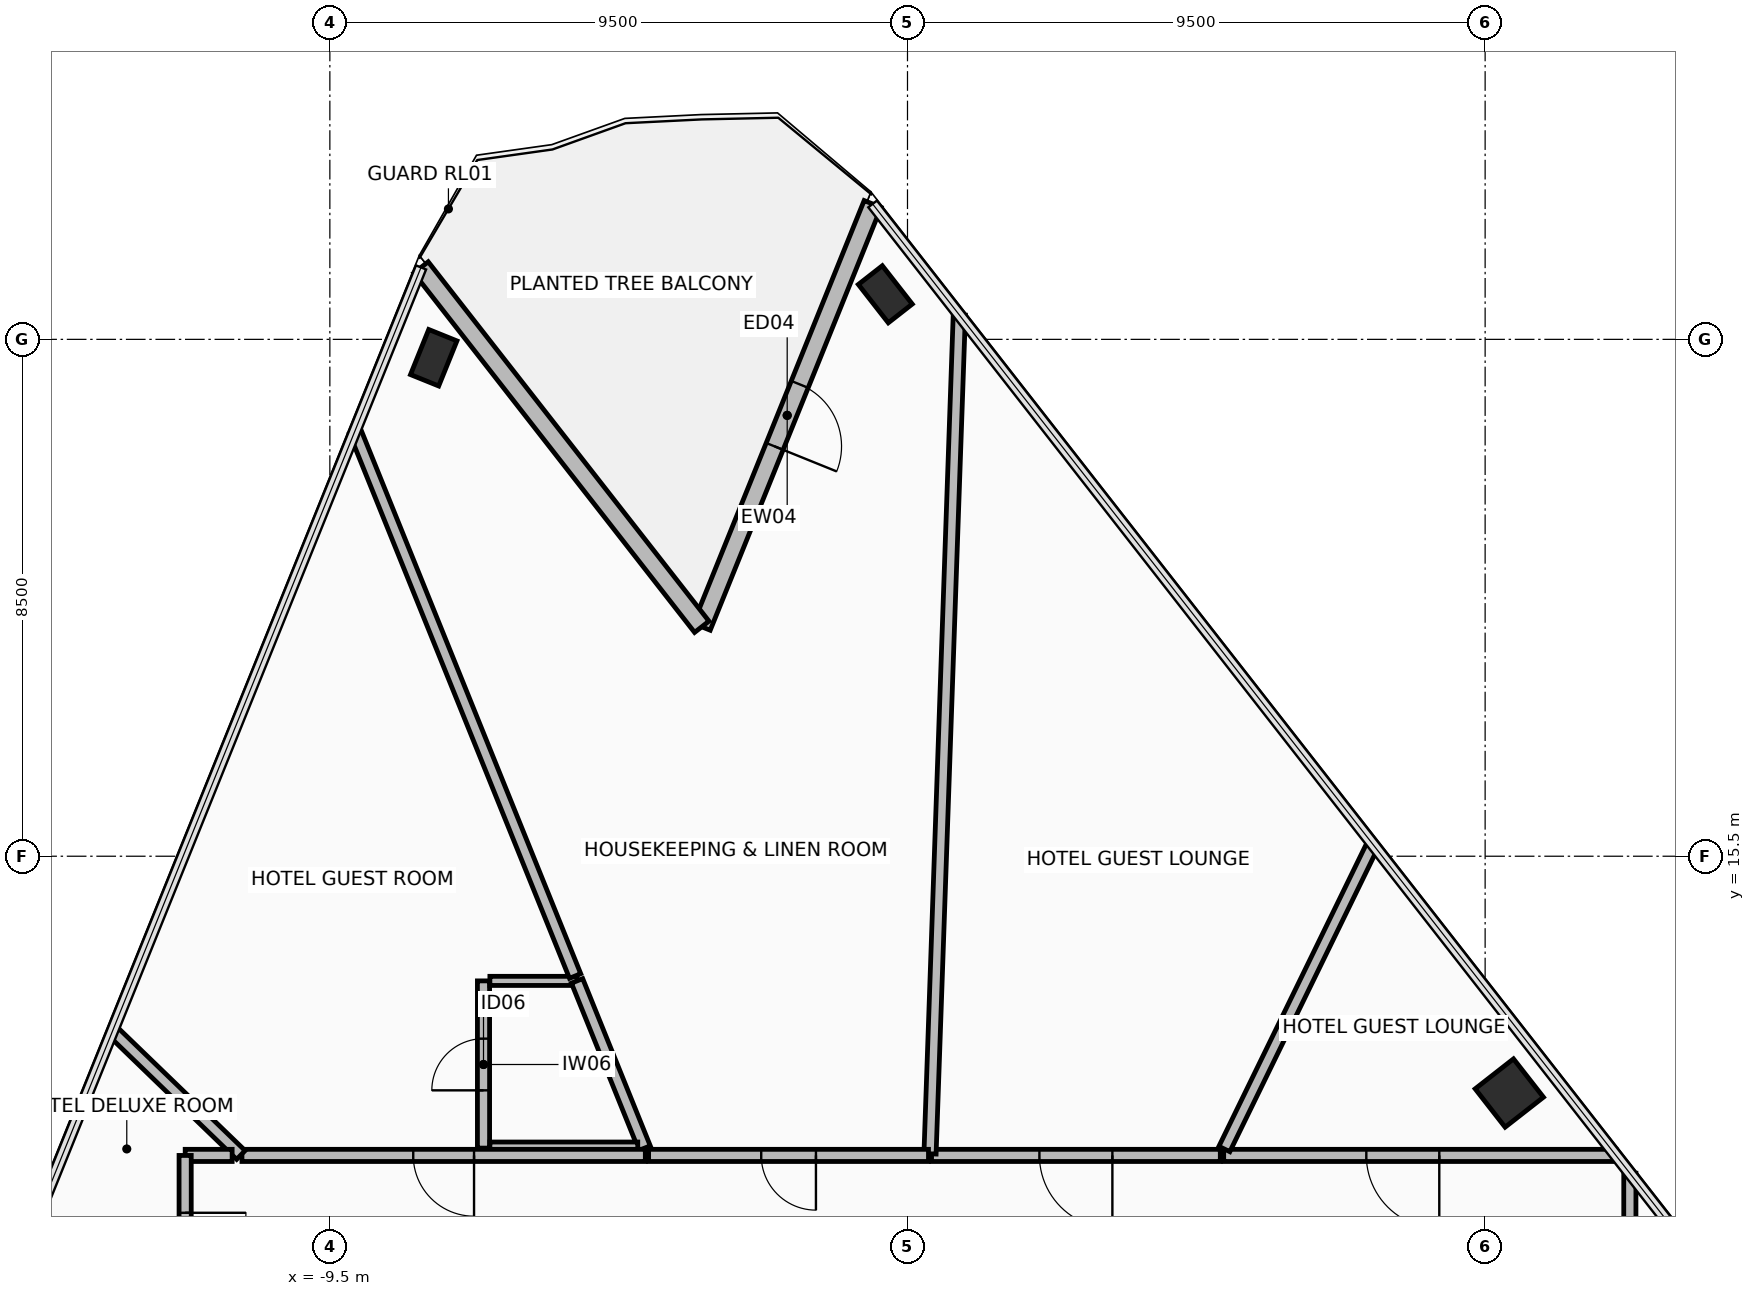
"""IFC4 building model, lengths in metres.
Left out: names, types, materials, properties, quantities, classifications, styles, units other than length and angle.
Written with IfcOpenShell. Run it as: python <this file> out.ifc"""

import sys

from ifc_helpers import new_model, si_unit, direction, frame, frame_2d, origin, origin_2d, place, context, subcontext, project, spatial, rectangle, hollow_rectangle, extrude, element, fill, save


model = new_model("IFC4")
c1 = context("Model", 3, precision=1e-05, world=origin(), true_north=direction((0.0, 1.0)))
c2 = subcontext(c1, "Body", "Model", "MODEL_VIEW")
j1 = project(units=[si_unit("LENGTHUNIT", "METRE"), si_unit("PLANEANGLEUNIT", "RADIAN")], contexts=[c1])
p1 = place(None, origin())
s1 = spatial("IfcSite", under=j1, at=p1, CompositionType="ELEMENT")
p2 = place(p1, origin())
s2 = spatial("IfcBuilding", under=s1, at=p2, CompositionType="ELEMENT")
p3 = place(p2, frame((0.0, 0.0, 77.65)))
s3 = spatial("IfcBuildingStorey", under=s2, at=p3, CompositionType="ELEMENT", Elevation=77.65)
p4 = place(p3, frame((-7.792, 23.698, 0.0), z_axis=(0.0, 0.0, 1.0), x_axis=(0.374608211656, 0.927183200754, 0.0)))
e1 = element("IfcColumn", 1, at=p4, inside=s3, PredefinedType="COLUMN", context=c2, shape_type="SweptSolid", body=[
    extrude(hollow_rectangle(XDim=0.5, YDim=0.8, WallThickness=0.04, at=origin_2d()), origin(), (0.0, 0.0, 1.0), 3.45),
])
p5 = place(p3, frame((9.898, 11.606, 0.0), z_axis=(0.0, 0.0, 1.0), x_axis=(-0.615661475326, 0.788010753607, 0.0)))
e2 = element("IfcColumn", 2, at=p5, inside=s3, PredefinedType="COLUMN", context=c2, shape_type="SweptSolid", body=[
    extrude(hollow_rectangle(XDim=0.8, YDim=0.8, WallThickness=0.045, at=origin_2d()), origin(), (0.0, 0.0, 1.0), 3.45),
])
p6 = place(p3, frame((-0.365, 24.741, 0.0), z_axis=(0.0, 0.0, 1.0), x_axis=(-0.615661475326, 0.788010753607, 0.0)))
e3 = element("IfcColumn", 3, at=p6, inside=s3, PredefinedType="COLUMN", context=c2, shape_type="SweptSolid", body=[
    extrude(hollow_rectangle(XDim=0.5, YDim=0.8, WallThickness=0.04, at=origin_2d()), origin(), (0.0, 0.0, 1.0), 3.45),
])
p7 = place(p3, frame((-0.574, 26.227, 0.0), z_axis=(0.0, 0.0, 1.0), x_axis=(-0.374609979755, -0.92718248639, 0.0)))
e4 = element("IfcWall", 4, at=p7, inside=s3, PredefinedType="STANDARD", context=c2, shape_type="SweptSolid", body=[
    extrude(rectangle(XDim=7.5, YDim=0.3, at=frame_2d((3.75, 0.0))), origin(), (0.0, 0.0, 1.0), 2.405),
])
p8 = place(p7, frame((3.2, 0.0, 0.0)))
e5 = element("IfcOpeningElement", 5, at=p8, cuts=e4, PredefinedType="OPENING", context=c2, shape_type="SweptSolid", body=[
    extrude(rectangle(XDim=1.1, YDim=2.2, at=frame_2d((0.55, 1.1))), frame((0.0, 0.16, 0.0), z_axis=(0.0, -1.0, 0.0), x_axis=(1.0, 0.0, 0.0)), (0.0, 0.0, 1.0), 0.32),
])
p9 = place(p3, frame((-3.383, 19.273, 0.0), z_axis=(0.0, 0.0, 1.0), x_axis=(-0.615654149001, 0.788016477504, 0.0)))
e6 = element("IfcWall", 6, at=p9, inside=s3, PredefinedType="STANDARD", context=c2, shape_type="SweptSolid", body=[
    extrude(rectangle(XDim=7.5, YDim=0.3, at=frame_2d((3.75, 0.0))), origin(), (0.0, 0.0, 1.0), 2.405),
])
p10 = place(p3, frame((-6.973, 10.7, 0.0), z_axis=(0.0, 0.0, 1.0), x_axis=(0.0, 1.0, 0.0)))
e7 = element("IfcWall", 7, at=p10, inside=s3, PredefinedType="PARTITIONING", context=c2, shape_type="SweptSolid", body=[
    extrude(rectangle(XDim=2.75, YDim=0.2, at=frame_2d((1.375, 0.0))), origin(), (0.0, 0.0, 1.0), 3.21),
])
p11 = place(p10, frame((0.95, 0.0, 0.0)))
e8 = element("IfcOpeningElement", 8, at=p11, cuts=e7, PredefinedType="OPENING", context=c2, shape_type="SweptSolid", body=[
    extrude(rectangle(XDim=0.85, YDim=2.1, at=frame_2d((0.425, 1.05))), frame((0.0, 0.11, 0.0), z_axis=(0.0, -1.0, 0.0), x_axis=(1.0, 0.0, 0.0)), (0.0, 0.0, 1.0), 0.22),
])
p12 = place(p3, frame((-6.868, 13.45, 0.0), z_axis=(0.0, 0.0, 1.0), x_axis=(1.0, 0.0, 0.0)))
e9 = element("IfcWall", 9, at=p12, inside=s3, PredefinedType="PARTITIONING", context=c2, shape_type="SweptSolid", body=[
    extrude(rectangle(XDim=1.434, YDim=0.15, at=frame_2d((0.717, 0.0))), origin(), (0.0, 0.0, 1.0), 3.21),
])
p13 = place(p3, frame((-5.434, 13.45, 0.0), z_axis=(0.0, 0.0, 1.0), x_axis=(0.374610031927, -0.927182465311, 0.0)))
e10 = element("IfcWall", 10, at=p13, inside=s3, PredefinedType="PARTITIONING", context=c2, shape_type="SweptSolid", body=[
    extrude(rectangle(XDim=2.966, YDim=0.2, at=frame_2d((1.483, 0.0))), origin(), (0.0, 0.0, 1.0), 3.21),
])
p14 = place(p3, frame((-4.436, 10.7, 0.0), z_axis=(0.0, 0.0, 1.0), x_axis=(-1.0, 0.0, 0.0)))
e11 = element("IfcWall", 11, at=p14, inside=s3, PredefinedType="PARTITIONING", context=c2, shape_type="SweptSolid", body=[
    extrude(rectangle(XDim=2.432, YDim=0.2, at=frame_2d((1.216, 0.0))), origin(), (0.0, 0.0, 1.0), 3.21),
])
p15 = place(p3, frame((11.88, 3.44, 0.0), z_axis=(0.0, 0.0, 1.0), x_axis=(0.0, 1.0, 0.0)))
e12 = element("IfcWall", 12, at=p15, inside=s3, PredefinedType="PARTITIONING", context=c2, shape_type="SweptSolid", body=[
    extrude(rectangle(XDim=6.847, YDim=0.2, at=frame_2d((3.424, 0.0))), origin(), (0.0, 0.0, 1.0), 2.405),
])
p16 = place(p15, frame((2.824, 0.0, 0.0)))
e13 = element("IfcOpeningElement", 13, at=p16, cuts=e12, PredefinedType="OPENING", context=c2, shape_type="SweptSolid", body=[
    extrude(rectangle(XDim=1.2, YDim=2.15, at=frame_2d((0.6, 1.075))), frame((0.0, 0.11, 0.0), z_axis=(0.0, -1.0, 0.0), x_axis=(1.0, 0.0, 0.0)), (0.0, 0.0, 1.0), 0.22),
])
p17 = place(p3, frame((11.651, 10.58, 0.0), z_axis=(0.0, 0.0, 1.0), x_axis=(-1.0, 0.0, 0.0)))
e14 = element("IfcWall", 14, at=p17, inside=s3, PredefinedType="PARTITIONING", context=c2, shape_type="SweptSolid", body=[
    extrude(rectangle(XDim=6.451, YDim=0.2, at=frame_2d((3.225, 0.0))), origin(), (0.0, 0.0, 1.0), 2.405),
])
p18 = place(p17, frame((2.905, 0.0, 0.0)))
e15 = element("IfcOpeningElement", 15, at=p18, cuts=e14, PredefinedType="OPENING", context=c2, shape_type="SweptSolid", body=[
    extrude(rectangle(XDim=1.2, YDim=2.15, at=frame_2d((0.6, 1.075))), frame((0.0, 0.11, 0.0), z_axis=(0.0, -1.0, 0.0), x_axis=(1.0, 0.0, 0.0)), (0.0, 0.0, 1.0), 0.22),
])
p19 = place(p3, frame((5.211, 10.685, 0.0), z_axis=(0.0, 0.0, 1.0), x_axis=(0.438361496965, 0.898798752769, 0.0)))
e16 = element("IfcWall", 16, at=p19, inside=s3, PredefinedType="PARTITIONING", context=c2, shape_type="SweptSolid", body=[
    extrude(rectangle(XDim=5.574, YDim=0.2, at=frame_2d((2.787, 0.0))), origin(), (0.0, 0.0, 1.0), 2.405),
])
p20 = place(p3, frame((5.145, 10.58, 0.0), z_axis=(0.0, 0.0, 1.0), x_axis=(-1.0, 0.0, 0.0)))
e17 = element("IfcWall", 17, at=p20, inside=s3, PredefinedType="PARTITIONING", context=c2, shape_type="SweptSolid", body=[
    extrude(rectangle(XDim=4.749, YDim=0.2, at=frame_2d((2.375, 0.0))), origin(), (0.0, 0.0, 1.0), 2.605),
])
p21 = place(p20, frame((1.775, 0.0, 0.0)))
e18 = element("IfcOpeningElement", 18, at=p21, cuts=e17, PredefinedType="OPENING", context=c2, shape_type="SweptSolid", body=[
    extrude(rectangle(XDim=1.2, YDim=2.15, at=frame_2d((0.6, 1.075))), frame((0.0, 0.11, 0.0), z_axis=(0.0, -1.0, 0.0), x_axis=(1.0, 0.0, 0.0)), (0.0, 0.0, 1.0), 0.22),
])
p22 = place(p3, frame((0.37, 10.606, 0.0), z_axis=(0.0, 0.0, 1.0), x_axis=(0.03489353046, 0.999391035347, 0.0)))
e19 = element("IfcWall", 19, at=p22, inside=s3, PredefinedType="PARTITIONING", context=c2, shape_type="SweptSolid", body=[
    extrude(rectangle(XDim=13.804, YDim=0.2, at=frame_2d((6.902, 0.0))), origin(), (0.0, 0.0, 1.0), 2.405),
])
p23 = place(p3, frame((0.345, 10.58, 0.0), z_axis=(0.0, 0.0, 1.0), x_axis=(-1.0, 0.0, 0.0)))
e20 = element("IfcWall", 20, at=p23, inside=s3, PredefinedType="PARTITIONING", context=c2, shape_type="SweptSolid", body=[
    extrude(rectangle(XDim=4.603, YDim=0.2, at=frame_2d((2.302, 0.0))), origin(), (0.0, 0.0, 1.0), 3.21),
])
p24 = place(p23, frame((1.851, 0.0, 0.0)))
e21 = element("IfcOpeningElement", 21, at=p24, cuts=e20, PredefinedType="OPENING", context=c2, shape_type="SweptSolid", body=[
    extrude(rectangle(XDim=0.9, YDim=2.1, at=frame_2d((0.45, 1.05))), frame((0.0, 0.11, 0.0), z_axis=(0.0, -1.0, 0.0), x_axis=(1.0, 0.0, 0.0)), (0.0, 0.0, 1.0), 0.22),
])
p25 = place(p3, frame((-5.467, 13.53, 0.0), z_axis=(0.0, 0.0, 1.0), x_axis=(-0.374609771438, 0.927182570556, 0.0)))
e22 = element("IfcWall", 22, at=p25, inside=s3, PredefinedType="PARTITIONING", context=c2, shape_type="SweptSolid", body=[
    extrude(rectangle(XDim=9.656, YDim=0.2, at=frame_2d((4.828, 0.0))), origin(), (0.0, 0.0, 1.0), 2.405),
])
p26 = place(p3, frame((-4.312, 10.58, 0.0), z_axis=(0.0, 0.0, 1.0), x_axis=(-1.0, 0.0, 0.0)))
e23 = element("IfcWall", 23, at=p26, inside=s3, PredefinedType="PARTITIONING", context=c2, shape_type="SweptSolid", body=[
    extrude(rectangle(XDim=6.634, YDim=0.2, at=frame_2d((3.317, 0.0))), origin(), (0.0, 0.0, 1.0), 2.605),
])
p27 = place(p26, frame((2.817, 0.0, 0.0)))
e24 = element("IfcOpeningElement", 24, at=p27, cuts=e23, PredefinedType="OPENING", context=c2, shape_type="SweptSolid", body=[
    extrude(rectangle(XDim=1.0, YDim=2.15, at=frame_2d((0.5, 1.075))), frame((0.0, 0.11, 0.0), z_axis=(0.0, -1.0, 0.0), x_axis=(1.0, 0.0, 0.0)), (0.0, 0.0, 1.0), 0.22),
])
p28 = place(p3, frame((-10.963, 10.587, 0.0), z_axis=(0.0, 0.0, 1.0), x_axis=(-0.719299093908, 0.69470052073, 0.0)))
e25 = element("IfcWall", 25, at=p28, inside=s3, PredefinedType="PARTITIONING", context=c2, shape_type="SweptSolid", body=[
    extrude(rectangle(XDim=2.918, YDim=0.2, at=frame_2d((1.459, 0.0))), origin(), (0.0, 0.0, 1.0), 2.405),
])
p29 = place(p3, frame((-11.107, 10.58, 0.0), z_axis=(0.0, 0.0, 1.0), x_axis=(-1.0, 0.0, 0.0)))
e26 = element("IfcWall", 26, at=p29, inside=s3, PredefinedType="PARTITIONING", context=c2, shape_type="SweptSolid", body=[
    extrude(rectangle(XDim=0.772, YDim=0.2, at=frame_2d((0.386, 0.0))), origin(), (0.0, 0.0, 1.0), 3.21),
])
p30 = place(p3, frame((-11.88, 10.579, 0.0), z_axis=(0.0, 0.0, 1.0), x_axis=(0.0, -1.0, 0.0)))
e27 = element("IfcWall", 27, at=p30, inside=s3, PredefinedType="PARTITIONING", context=c2, shape_type="SweptSolid", body=[
    extrude(rectangle(XDim=3.445, YDim=0.2, at=frame_2d((1.723, 0.0))), origin(), (0.0, 0.0, 1.0), 2.605),
])
p31 = place(p30, frame((0.943, 0.0, 0.0)))
e28 = element("IfcOpeningElement", 28, at=p31, cuts=e27, PredefinedType="OPENING", context=c2, shape_type="SweptSolid", body=[
    extrude(rectangle(XDim=1.0, YDim=2.15, at=frame_2d((0.5, 1.075))), frame((0.0, 0.11, 0.0), z_axis=(0.0, -1.0, 0.0), x_axis=(1.0, 0.0, 0.0)), (0.0, 0.0, 1.0), 0.22),
])
p32 = place(p8, frame((1.1, 0.0, 0.0), z_axis=(0.0, 0.0, 1.0), x_axis=(-1.0, 0.0, 0.0)))
e29 = element("IfcDoor", 29, at=p32, inside=s3, OperationType="SINGLE_SWING_LEFT", PredefinedType="DOOR", context=c2, shape_type="SweptSolid", body=[
    extrude(rectangle(XDim=1.1, YDim=2.2, at=frame_2d((0.55, 1.1))), frame((0.0, 0.025, 0.0), z_axis=(0.0, -1.0, 0.0), x_axis=(1.0, 0.0, 0.0)), (0.0, 0.0, 1.0), 0.05),
])
fill(e5, e29)
p33 = place(p11, origin())
e30 = element("IfcDoor", 30, at=p33, inside=s3, OperationType="SINGLE_SWING_RIGHT", PredefinedType="DOOR", context=c2, shape_type="SweptSolid", body=[
    extrude(rectangle(XDim=0.85, YDim=2.1, at=frame_2d((0.425, 1.05))), frame((0.0, 0.025, 0.0), z_axis=(0.0, -1.0, 0.0), x_axis=(1.0, 0.0, 0.0)), (0.0, 0.0, 1.0), 0.05),
])
fill(e8, e30)
p34 = place(p18, origin())
e31 = element("IfcDoor", 31, at=p34, inside=s3, OperationType="SINGLE_SWING_LEFT", PredefinedType="DOOR", context=c2, shape_type="SweptSolid", body=[
    extrude(rectangle(XDim=1.2, YDim=2.15, at=frame_2d((0.6, 1.075))), frame((0.0, 0.025, 0.0), z_axis=(0.0, -1.0, 0.0), x_axis=(1.0, 0.0, 0.0)), (0.0, 0.0, 1.0), 0.05),
])
fill(e15, e31)
p35 = place(p21, origin())
e32 = element("IfcDoor", 32, at=p35, inside=s3, OperationType="SINGLE_SWING_LEFT", PredefinedType="DOOR", context=c2, shape_type="SweptSolid", body=[
    extrude(rectangle(XDim=1.2, YDim=2.15, at=frame_2d((0.6, 1.075))), frame((0.0, 0.025, 0.0), z_axis=(0.0, -1.0, 0.0), x_axis=(1.0, 0.0, 0.0)), (0.0, 0.0, 1.0), 0.05),
])
fill(e18, e32)
p36 = place(p24, origin())
e33 = element("IfcDoor", 33, at=p36, inside=s3, OperationType="SINGLE_SWING_LEFT", PredefinedType="DOOR", context=c2, shape_type="SweptSolid", body=[
    extrude(rectangle(XDim=0.9, YDim=2.1, at=frame_2d((0.45, 1.05))), frame((0.0, 0.025, 0.0), z_axis=(0.0, -1.0, 0.0), x_axis=(1.0, 0.0, 0.0)), (0.0, 0.0, 1.0), 0.05),
])
fill(e21, e33)
p37 = place(p27, origin())
e34 = element("IfcDoor", 34, at=p37, inside=s3, OperationType="SINGLE_SWING_LEFT", PredefinedType="DOOR", context=c2, shape_type="SweptSolid", body=[
    extrude(rectangle(XDim=1.0, YDim=2.15, at=frame_2d((0.5, 1.075))), frame((0.0, 0.025, 0.0), z_axis=(0.0, -1.0, 0.0), x_axis=(1.0, 0.0, 0.0)), (0.0, 0.0, 1.0), 0.05),
])
fill(e24, e34)
p38 = place(p31, origin())
e35 = element("IfcDoor", 35, at=p38, inside=s3, OperationType="SINGLE_SWING_LEFT", PredefinedType="DOOR", context=c2, shape_type="SweptSolid", body=[
    extrude(rectangle(XDim=1.0, YDim=2.15, at=frame_2d((0.5, 1.075))), frame((0.0, 0.025, 0.0), z_axis=(0.0, -1.0, 0.0), x_axis=(1.0, 0.0, 0.0)), (0.0, 0.0, 1.0), 0.05),
])
fill(e28, e35)
save(model, sys.argv[1])
